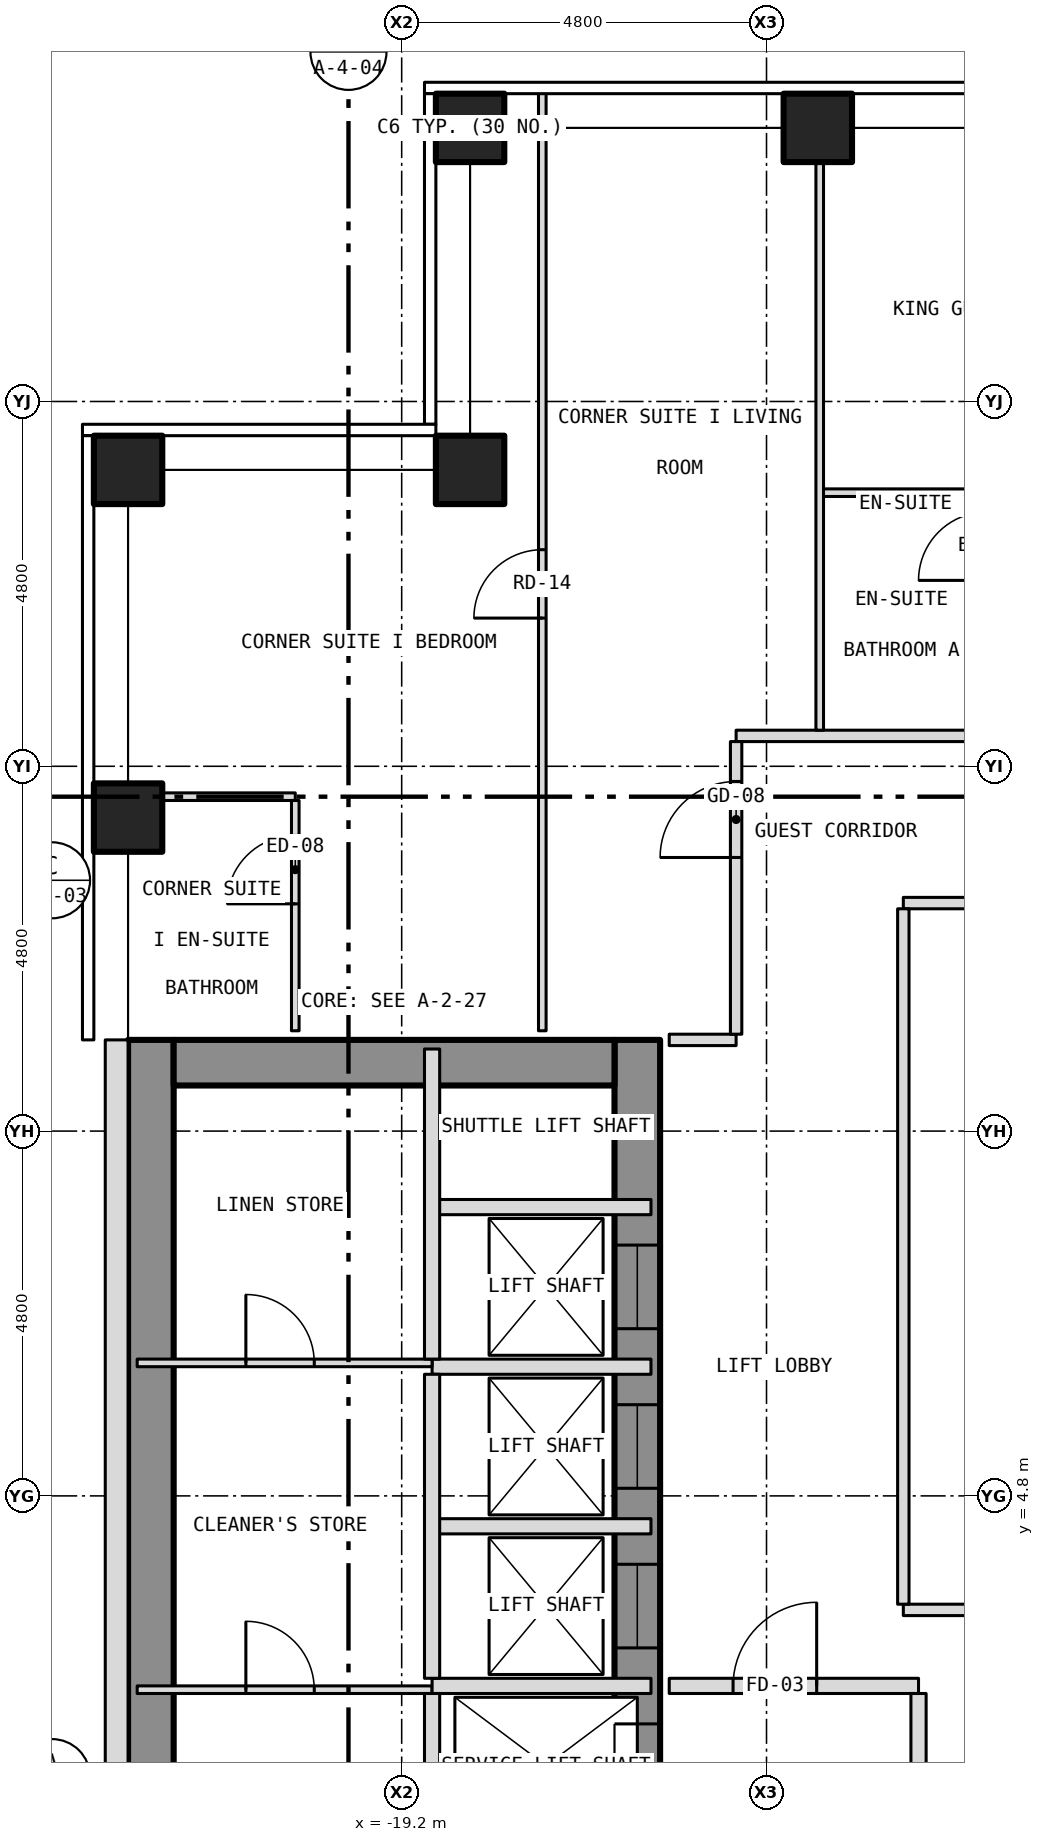
"""IFC4 building model, lengths in metres.
Left out: names, types, materials, properties, quantities, classifications, styles, units other than length and angle.
Written with IfcOpenShell. Run it as: python <this file> out.ifc"""

import sys

from ifc_helpers import new_model, si_unit, direction, frame, frame_2d, origin, origin_2d, place, context, subcontext, project, spatial, rectangle, hollow_rectangle, extrude, element, fill, save


model = new_model("IFC4")
c1 = context("Model", 3, precision=1e-05, world=origin(), true_north=direction((0.0, 1.0)))
c2 = subcontext(c1, "Body", "Model", "MODEL_VIEW")
j1 = project(units=[si_unit("LENGTHUNIT", "METRE"), si_unit("PLANEANGLEUNIT", "RADIAN")], contexts=[c1])
p1 = place(None, origin())
s1 = spatial("IfcSite", under=j1, at=p1, CompositionType="ELEMENT")
p2 = place(p1, origin())
s2 = spatial("IfcBuilding", under=s1, at=p2, CompositionType="ELEMENT")
p3 = place(p2, frame((0.0, 0.0, 99.5)))
s3 = spatial("IfcBuildingStorey", under=s2, at=p3, CompositionType="ELEMENT", Elevation=99.5)
for number, where, z_axis, x_axis in (
    (1, (-18.3, 22.8, -0.15), (0.0, 0.0, 1.0), (1.0, 0.0, 0.0)),
    (2, (-13.725, 22.8, -0.15), (0.0, 0.0, 1.0), (1.0, 0.0, 0.0)),
    (3, (-22.8, 13.725, -0.15), (0.0, 0.0, 1.0), (1.0, 0.0, 0.0)),
    (4, (-22.8, 18.3, -0.15), (0.0, 0.0, 1.0), (1.0, 0.0, 0.0)),
    (5, (-18.3, 18.3, -0.15), (0.0, 0.0, 1.0), (1.0, 0.0, 0.0)),
):
    element("IfcColumn", number, at=place(p3, frame(where, z_axis=z_axis, x_axis=x_axis)), inside=s3, PredefinedType="COLUMN", context=c2, shape_type="SweptSolid", body=[
        extrude(hollow_rectangle(XDim=0.9, YDim=0.9, WallThickness=0.05, at=origin_2d()), origin(), (0.0, 0.0, 1.0), 3.5),
    ])
p4 = place(p3, frame((-16.1, -10.8, 0.0), z_axis=(0.0, 0.0, 1.0), x_axis=(0.0, 1.0, 0.0)))
e6 = element("IfcWall", 6, at=p4, inside=s3, PredefinedType="SHEAR", context=c2, shape_type="SweptSolid", body=[
    extrude(rectangle(XDim=21.6, YDim=0.6, at=frame_2d((10.8, 0.0))), origin(), (0.0, 0.0, 1.0), 3.25),
])
p5 = place(p4, frame((9.4, 0.0, 0.0)))
e7 = element("IfcOpeningElement", 7, at=p5, cuts=e6, PredefinedType="OPENING", context=c2, shape_type="SweptSolid", body=[
    extrude(rectangle(XDim=1.1, YDim=2.1, at=frame_2d((0.55, 1.05))), frame((0.0, 0.312, 0.0), z_axis=(0.0, -1.0, 0.0), x_axis=(1.0, 0.0, 0.0)), (0.0, 0.0, 1.0), 0.624),
])
p6 = place(p4, frame((11.5, 0.0, 0.0)))
e8 = element("IfcOpeningElement", 8, at=p6, cuts=e6, PredefinedType="OPENING", context=c2, shape_type="SweptSolid", body=[
    extrude(rectangle(XDim=1.1, YDim=2.1, at=frame_2d((0.55, 1.05))), frame((0.0, 0.312, 0.0), z_axis=(0.0, -1.0, 0.0), x_axis=(1.0, 0.0, 0.0)), (0.0, 0.0, 1.0), 0.624),
])
p7 = place(p4, frame((13.6, 0.0, 0.0)))
e9 = element("IfcOpeningElement", 9, at=p7, cuts=e6, PredefinedType="OPENING", context=c2, shape_type="SweptSolid", body=[
    extrude(rectangle(XDim=1.1, YDim=2.1, at=frame_2d((0.55, 1.05))), frame((0.0, 0.312, 0.0), z_axis=(0.0, -1.0, 0.0), x_axis=(1.0, 0.0, 0.0)), (0.0, 0.0, 1.0), 0.624),
])
p8 = place(p4, frame((15.7, 0.0, 0.0)))
e10 = element("IfcOpeningElement", 10, at=p8, cuts=e6, PredefinedType="OPENING", context=c2, shape_type="SweptSolid", body=[
    extrude(rectangle(XDim=1.1, YDim=2.1, at=frame_2d((0.55, 1.05))), frame((0.0, 0.312, 0.0), z_axis=(0.0, -1.0, 0.0), x_axis=(1.0, 0.0, 0.0)), (0.0, 0.0, 1.0), 0.624),
])
p9 = place(p4, frame((17.8, 0.0, 0.0)))
e11 = element("IfcOpeningElement", 11, at=p9, cuts=e6, PredefinedType="OPENING", context=c2, shape_type="SweptSolid", body=[
    extrude(rectangle(XDim=1.1, YDim=2.1, at=frame_2d((0.55, 1.05))), frame((0.0, 0.312, 0.0), z_axis=(0.0, -1.0, 0.0), x_axis=(1.0, 0.0, 0.0)), (0.0, 0.0, 1.0), 0.624),
])
p10 = place(p4, frame((0.758, 0.0, 0.0)))
e12 = element("IfcOpeningElement", 12, at=p10, cuts=e6, PredefinedType="OPENING", context=c2, shape_type="SweptSolid", body=[
    extrude(rectangle(XDim=1.1, YDim=2.1, at=frame_2d((0.55, 1.05))), frame((0.0, 0.312, 0.0), z_axis=(0.0, -1.0, 0.0), x_axis=(1.0, 0.0, 0.0)), (0.0, 0.0, 1.0), 0.624),
])
p11 = place(p4, frame((7.5, 0.0, 0.0)))
e13 = element("IfcOpeningElement", 13, at=p11, cuts=e6, PredefinedType="OPENING", context=c2, shape_type="SweptSolid", body=[
    extrude(rectangle(XDim=1.1, YDim=2.1, at=frame_2d((0.55, 1.05))), frame((0.0, 0.312, 0.0), z_axis=(0.0, -1.0, 0.0), x_axis=(1.0, 0.0, 0.0)), (0.0, 0.0, 1.0), 0.624),
])
p12 = place(p3, frame((-22.5, -10.8, 0.0), z_axis=(0.0, 0.0, 1.0), x_axis=(0.0, 1.0, 0.0)))
e14 = element("IfcWall", 14, at=p12, inside=s3, PredefinedType="SHEAR", context=c2, shape_type="SweptSolid", body=[
    extrude(rectangle(XDim=21.6, YDim=0.6, at=frame_2d((10.8, 0.0))), origin(), (0.0, 0.0, 1.0), 3.25),
])
p13 = place(p3, frame((-22.2, 10.5, 0.0), z_axis=(0.0, 0.0, 1.0), x_axis=(1.0, 0.0, 0.0)))
e15 = element("IfcWall", 15, at=p13, inside=s3, PredefinedType="SHEAR", context=c2, shape_type="SweptSolid", body=[
    extrude(rectangle(XDim=5.8, YDim=0.6, at=frame_2d((2.9, 0.0))), origin(), (0.0, 0.0, 1.0), 3.25),
])
p14 = place(p3, frame((-22.95, 10.8, 0.0), z_axis=(0.0, 0.0, 1.0), x_axis=(0.0, -1.0, 0.0)))
e16 = element("IfcWall", 16, at=p14, inside=s3, PredefinedType="SOLIDWALL", context=c2, shape_type="SweptSolid", body=[
    extrude(rectangle(XDim=21.6, YDim=0.3, at=frame_2d((10.8, 0.0))), origin(), (0.0, 0.0, 1.0), 3.5),
])
p15 = place(p14, frame((18.05, 0.0, 1.0)))
e17 = element("IfcOpeningElement", 17, at=p15, cuts=e16, PredefinedType="OPENING", context=c2, shape_type="SweptSolid", body=[
    extrude(rectangle(XDim=0.6, YDim=1.5, at=frame_2d((0.3, 0.75))), frame((0.0, 0.162, 0.0), z_axis=(0.0, -1.0, 0.0), x_axis=(1.0, 0.0, 0.0)), (0.0, 0.0, 1.0), 0.324),
])
p16 = place(p3, frame((-22.68, 2.25, 0.0), z_axis=(0.0, 0.0, 1.0), x_axis=(1.0, 0.0, 0.0)))
e18 = element("IfcWall", 18, at=p16, inside=s3, PredefinedType="PARTITIONING", context=c2, shape_type="SweptSolid", body=[
    extrude(rectangle(XDim=3.88, YDim=0.1, at=frame_2d((1.94, 0.0))), origin(), (0.0, 0.0, 1.0), 3.25),
])
p17 = place(p16, frame((1.43, 0.0, 0.0)))
e19 = element("IfcOpeningElement", 19, at=p17, cuts=e18, PredefinedType="OPENING", context=c2, shape_type="SweptSolid", body=[
    extrude(rectangle(XDim=0.9, YDim=2.1, at=frame_2d((0.45, 1.05))), frame((0.0, 0.062, 0.0), z_axis=(0.0, -1.0, 0.0), x_axis=(1.0, 0.0, 0.0)), (0.0, 0.0, 1.0), 0.124),
])
p18 = place(p3, frame((-18.8, 2.3, 0.0), z_axis=(0.0, 0.0, 1.0), x_axis=(1.0, 0.0, 0.0)))
e20 = element("IfcWall", 20, at=p18, inside=s3, PredefinedType="PARTITIONING", context=c2, shape_type="SweptSolid", body=[
    extrude(rectangle(XDim=2.88, YDim=0.2, at=frame_2d((1.44, 0.0))), origin(), (0.0, 0.0, 1.0), 3.25),
])
p19 = place(p3, frame((-15.68, 2.3, 0.0), z_axis=(0.0, 0.0, 1.0), x_axis=(1.0, 0.0, 0.0)))
e21 = element("IfcWall", 21, at=p19, inside=s3, PredefinedType="PARTITIONING", context=c2, shape_type="SweptSolid", body=[
    extrude(rectangle(XDim=3.28, YDim=0.2, at=frame_2d((1.64, 0.0))), origin(), (0.0, 0.0, 1.0), 3.35),
])
p20 = place(p19, frame((0.84, 0.0, 0.0)))
e22 = element("IfcOpeningElement", 22, at=p20, cuts=e21, PredefinedType="OPENING", context=c2, shape_type="SweptSolid", body=[
    extrude(rectangle(XDim=1.1, YDim=2.1, at=frame_2d((0.55, 1.05))), frame((0.0, 0.112, 0.0), z_axis=(0.0, -1.0, 0.0), x_axis=(1.0, 0.0, 0.0)), (0.0, 0.0, 1.0), 0.224),
])
p21 = place(p3, frame((-12.6, 3.3, 0.0), z_axis=(0.0, 0.0, 1.0), x_axis=(1.0, 0.0, 0.0)))
e23 = element("IfcWall", 23, at=p21, inside=s3, PredefinedType="PARTITIONING", context=c2, shape_type="SweptSolid", body=[
    extrude(rectangle(XDim=25.2, YDim=0.15, at=frame_2d((12.6, 0.0))), origin(), (0.0, 0.0, 1.0), 3.35),
])
for number, where, z_axis, x_axis in (
    (24, (-18.8, 4.4, 0.0), (0.0, 0.0, 1.0), (1.0, 0.0, 0.0)),
    (25, (-18.8, 6.5, 0.0), (0.0, 0.0, 1.0), (1.0, 0.0, 0.0)),
):
    element("IfcWall", number, at=place(p3, frame(where, z_axis=z_axis, x_axis=x_axis)), inside=s3, PredefinedType="PARTITIONING", context=c2, shape_type="SweptSolid", body=[
        extrude(rectangle(XDim=2.88, YDim=0.2, at=frame_2d((1.44, 0.0))), origin(), (0.0, 0.0, 1.0), 3.25),
    ])
p22 = place(p3, frame((-22.68, 6.55, 0.0), z_axis=(0.0, 0.0, 1.0), x_axis=(1.0, 0.0, 0.0)))
e26 = element("IfcWall", 26, at=p22, inside=s3, PredefinedType="PARTITIONING", context=c2, shape_type="SweptSolid", body=[
    extrude(rectangle(XDim=3.88, YDim=0.1, at=frame_2d((1.94, 0.0))), origin(), (0.0, 0.0, 1.0), 3.25),
])
p23 = place(p22, frame((1.43, 0.0, 0.0)))
e27 = element("IfcOpeningElement", 27, at=p23, cuts=e26, PredefinedType="OPENING", context=c2, shape_type="SweptSolid", body=[
    extrude(rectangle(XDim=0.9, YDim=2.1, at=frame_2d((0.45, 1.05))), frame((0.0, 0.062, 0.0), z_axis=(0.0, -1.0, 0.0), x_axis=(1.0, 0.0, 0.0)), (0.0, 0.0, 1.0), 0.124),
])
p24 = place(p3, frame((-18.8, 8.6, 0.0), z_axis=(0.0, 0.0, 1.0), x_axis=(1.0, 0.0, 0.0)))
e28 = element("IfcWall", 28, at=p24, inside=s3, PredefinedType="PARTITIONING", context=c2, shape_type="SweptSolid", body=[
    extrude(rectangle(XDim=2.88, YDim=0.2, at=frame_2d((1.44, 0.0))), origin(), (0.0, 0.0, 1.0), 3.25),
])
p25 = place(p3, frame((-15.68, 10.8, 0.0), z_axis=(0.0, 0.0, 1.0), x_axis=(1.0, 0.0, 0.0)))
e29 = element("IfcWall", 29, at=p25, inside=s3, PredefinedType="PARTITIONING", context=c2, shape_type="SweptSolid", body=[
    extrude(rectangle(XDim=0.88, YDim=0.15, at=frame_2d((0.44, 0.0))), origin(), (0.0, 0.0, 1.0), 3.35),
])
p26 = place(p3, frame((-12.6, 12.6, 0.0), z_axis=(0.0, 0.0, 1.0), x_axis=(1.0, 0.0, 0.0)))
e30 = element("IfcWall", 30, at=p26, inside=s3, PredefinedType="PARTITIONING", context=c2, shape_type="SweptSolid", body=[
    extrude(rectangle(XDim=25.2, YDim=0.15, at=frame_2d((12.6, 0.0))), origin(), (0.0, 0.0, 1.0), 3.35),
])
p27 = place(p26, frame((5.85, 0.0, 0.0)))
e31 = element("IfcOpeningElement", 31, at=p27, cuts=e30, PredefinedType="OPENING", context=c2, shape_type="SweptSolid", body=[
    extrude(rectangle(XDim=0.9, YDim=2.1, at=frame_2d((0.45, 1.05))), frame((0.0, 0.087, 0.0), z_axis=(0.0, -1.0, 0.0), x_axis=(1.0, 0.0, 0.0)), (0.0, 0.0, 1.0), 0.174),
])
p28 = place(p26, frame((18.45, 0.0, 0.0)))
e32 = element("IfcOpeningElement", 32, at=p28, cuts=e30, PredefinedType="OPENING", context=c2, shape_type="SweptSolid", body=[
    extrude(rectangle(XDim=0.9, YDim=2.1, at=frame_2d((0.45, 1.05))), frame((0.0, 0.087, 0.0), z_axis=(0.0, -1.0, 0.0), x_axis=(1.0, 0.0, 0.0)), (0.0, 0.0, 1.0), 0.174),
])
p29 = place(p3, frame((-22.68, 14.0, 0.0), z_axis=(0.0, 0.0, 1.0), x_axis=(1.0, 0.0, 0.0)))
e33 = element("IfcWall", 33, at=p29, inside=s3, PredefinedType="PARTITIONING", context=c2, shape_type="SweptSolid", body=[
    extrude(rectangle(XDim=2.08, YDim=0.1, at=frame_2d((1.04, 0.0))), origin(), (0.0, 0.0, 1.0), 3.35),
])
p30 = place(p3, frame((-14.8, 14.8, 0.0), z_axis=(0.0, 0.0, 1.0), x_axis=(1.0, 0.0, 0.0)))
e34 = element("IfcWall", 34, at=p30, inside=s3, PredefinedType="PARTITIONING", context=c2, shape_type="SweptSolid", body=[
    extrude(rectangle(XDim=29.6, YDim=0.15, at=frame_2d((14.8, 0.0))), origin(), (0.0, 0.0, 1.0), 3.35),
])
p31 = place(p30, frame((3.963, 0.0, 0.0)))
e35 = element("IfcOpeningElement", 35, at=p31, cuts=e34, PredefinedType="OPENING", context=c2, shape_type="SweptSolid", body=[
    extrude(rectangle(XDim=1.0, YDim=2.1, at=frame_2d((0.5, 1.05))), frame((0.0, 0.087, 0.0), z_axis=(0.0, -1.0, 0.0), x_axis=(1.0, 0.0, 0.0)), (0.0, 0.0, 1.0), 0.174),
])
p32 = place(p30, frame((12.241, 0.0, 0.0)))
e36 = element("IfcOpeningElement", 36, at=p32, cuts=e34, PredefinedType="OPENING", context=c2, shape_type="SweptSolid", body=[
    extrude(rectangle(XDim=1.0, YDim=2.1, at=frame_2d((0.5, 1.05))), frame((0.0, 0.087, 0.0), z_axis=(0.0, -1.0, 0.0), x_axis=(1.0, 0.0, 0.0)), (0.0, 0.0, 1.0), 0.174),
])
p33 = place(p30, frame((21.213, 0.0, 0.0)))
e37 = element("IfcOpeningElement", 37, at=p33, cuts=e34, PredefinedType="OPENING", context=c2, shape_type="SweptSolid", body=[
    extrude(rectangle(XDim=0.9, YDim=2.1, at=frame_2d((0.45, 1.05))), frame((0.0, 0.087, 0.0), z_axis=(0.0, -1.0, 0.0), x_axis=(1.0, 0.0, 0.0)), (0.0, 0.0, 1.0), 0.174),
])
p34 = place(p3, frame((-13.7, 18.0, 0.0), z_axis=(0.0, 0.0, 1.0), x_axis=(1.0, 0.0, 0.0)))
e38 = element("IfcWall", 38, at=p34, inside=s3, PredefinedType="PARTITIONING", context=c2, shape_type="SweptSolid", body=[
    extrude(rectangle(XDim=2.2, YDim=0.1, at=frame_2d((1.1, 0.0))), origin(), (0.0, 0.0, 1.0), 3.35),
])
p35 = place(p3, frame((-20.6, 10.92, 0.0), z_axis=(0.0, 0.0, 1.0), x_axis=(0.0, 1.0, 0.0)))
e39 = element("IfcWall", 39, at=p35, inside=s3, PredefinedType="PARTITIONING", context=c2, shape_type="SweptSolid", body=[
    extrude(rectangle(XDim=3.03, YDim=0.1, at=frame_2d((1.515, 0.0))), origin(), (0.0, 0.0, 1.0), 3.35),
])
p36 = place(p35, frame((1.67, 0.0, 0.0)))
e40 = element("IfcOpeningElement", 40, at=p36, cuts=e39, PredefinedType="OPENING", context=c2, shape_type="SweptSolid", body=[
    extrude(rectangle(XDim=0.9, YDim=2.1, at=frame_2d((0.45, 1.05))), frame((0.0, 0.062, 0.0), z_axis=(0.0, -1.0, 0.0), x_axis=(1.0, 0.0, 0.0)), (0.0, 0.0, 1.0), 0.124),
])
for number, where, z_axis, x_axis in (
    (41, (-18.8, -1.8, 0.0), (0.0, 0.0, 1.0), (0.0, 1.0, 0.0)),
    (42, (-18.8, 2.4, 0.0), (0.0, 0.0, 1.0), (0.0, 1.0, 0.0)),
):
    element("IfcWall", number, at=place(p3, frame(where, z_axis=z_axis, x_axis=x_axis)), inside=s3, PredefinedType="PARTITIONING", context=c2, shape_type="SweptSolid", body=[
        extrude(rectangle(XDim=4.0, YDim=0.2, at=frame_2d((2.0, 0.0))), origin(), (0.0, 0.0, 1.0), 3.25),
    ])
p37 = place(p3, frame((-18.8, 6.6, 0.0), z_axis=(0.0, 0.0, 1.0), x_axis=(0.0, 1.0, 0.0)))
e43 = element("IfcWall", 43, at=p37, inside=s3, PredefinedType="PARTITIONING", context=c2, shape_type="SweptSolid", body=[
    extrude(rectangle(XDim=4.08, YDim=0.2, at=frame_2d((2.04, 0.0))), origin(), (0.0, 0.0, 1.0), 3.25),
])
p38 = place(p3, frame((-17.35, 10.92, 0.0), z_axis=(0.0, 0.0, 1.0), x_axis=(0.0, 1.0, 0.0)))
e44 = element("IfcWall", 44, at=p38, inside=s3, PredefinedType="PARTITIONING", context=c2, shape_type="SweptSolid", body=[
    extrude(rectangle(XDim=12.36, YDim=0.1, at=frame_2d((6.18, 0.0))), origin(), (0.0, 0.0, 1.0), 3.35),
])
p39 = place(p38, frame((5.43, 0.0, 0.0)))
e45 = element("IfcOpeningElement", 45, at=p39, cuts=e44, PredefinedType="OPENING", context=c2, shape_type="SweptSolid", body=[
    extrude(rectangle(XDim=0.9, YDim=2.1, at=frame_2d((0.45, 1.05))), frame((0.0, 0.062, 0.0), z_axis=(0.0, -1.0, 0.0), x_axis=(1.0, 0.0, 0.0)), (0.0, 0.0, 1.0), 0.124),
])
p40 = place(p3, frame((-14.8, 10.875, 0.0), z_axis=(0.0, 0.0, 1.0), x_axis=(0.0, 1.0, 0.0)))
e46 = element("IfcWall", 46, at=p40, inside=s3, PredefinedType="PARTITIONING", context=c2, shape_type="SweptSolid", body=[
    extrude(rectangle(XDim=3.85, YDim=0.15, at=frame_2d((1.925, 0.0))), origin(), (0.0, 0.0, 1.0), 3.35),
])
p41 = place(p40, frame((2.325, 0.0, 0.0)))
e47 = element("IfcOpeningElement", 47, at=p41, cuts=e46, PredefinedType="OPENING", context=c2, shape_type="SweptSolid", body=[
    extrude(rectangle(XDim=1.0, YDim=2.1, at=frame_2d((0.5, 1.05))), frame((0.0, 0.087, 0.0), z_axis=(0.0, -1.0, 0.0), x_axis=(1.0, 0.0, 0.0)), (0.0, 0.0, 1.0), 0.174),
])
p42 = place(p3, frame((-13.7, 14.875, 0.0), z_axis=(0.0, 0.0, 1.0), x_axis=(0.0, 1.0, 0.0)))
e48 = element("IfcWall", 48, at=p42, inside=s3, PredefinedType="PARTITIONING", context=c2, shape_type="SweptSolid", body=[
    extrude(rectangle(XDim=7.805, YDim=0.1, at=frame_2d((3.902, 0.0))), origin(), (0.0, 0.0, 1.0), 3.35),
])
p43 = place(p3, frame((-12.6, 3.375, 0.0), z_axis=(0.0, 0.0, 1.0), x_axis=(0.0, 1.0, 0.0)))
e49 = element("IfcWall", 49, at=p43, inside=s3, PredefinedType="PARTITIONING", context=c2, shape_type="SweptSolid", body=[
    extrude(rectangle(XDim=9.15, YDim=0.15, at=frame_2d((4.575, 0.0))), origin(), (0.0, 0.0, 1.0), 3.35),
])
p44 = place(p3, frame((-12.4, -1.8, 0.0), z_axis=(0.0, 0.0, 1.0), x_axis=(0.0, 1.0, 0.0)))
e50 = element("IfcWall", 50, at=p44, inside=s3, PredefinedType="PARTITIONING", context=c2, shape_type="SweptSolid", body=[
    extrude(rectangle(XDim=4.0, YDim=0.2, at=frame_2d((2.0, 0.0))), origin(), (0.0, 0.0, 1.0), 3.35),
])
p45 = place(p6, origin())
e51 = element("IfcDoor", 51, at=p45, inside=s3, OperationType="SLIDING_TO_LEFT", PredefinedType="DOOR", context=c2, shape_type="SweptSolid", body=[
    extrude(rectangle(XDim=1.1, YDim=2.1, at=frame_2d((0.55, 1.05))), frame((0.0, 0.025, 0.0), z_axis=(0.0, -1.0, 0.0), x_axis=(1.0, 0.0, 0.0)), (0.0, 0.0, 1.0), 0.05),
])
fill(e8, e51)
p46 = place(p7, origin())
e52 = element("IfcDoor", 52, at=p46, inside=s3, OperationType="SLIDING_TO_LEFT", PredefinedType="DOOR", context=c2, shape_type="SweptSolid", body=[
    extrude(rectangle(XDim=1.1, YDim=2.1, at=frame_2d((0.55, 1.05))), frame((0.0, 0.025, 0.0), z_axis=(0.0, -1.0, 0.0), x_axis=(1.0, 0.0, 0.0)), (0.0, 0.0, 1.0), 0.05),
])
fill(e9, e52)
p47 = place(p8, origin())
e53 = element("IfcDoor", 53, at=p47, inside=s3, OperationType="SLIDING_TO_LEFT", PredefinedType="DOOR", context=c2, shape_type="SweptSolid", body=[
    extrude(rectangle(XDim=1.1, YDim=2.1, at=frame_2d((0.55, 1.05))), frame((0.0, 0.025, 0.0), z_axis=(0.0, -1.0, 0.0), x_axis=(1.0, 0.0, 0.0)), (0.0, 0.0, 1.0), 0.05),
])
fill(e10, e53)
p48 = place(p9, origin())
e54 = element("IfcDoor", 54, at=p48, inside=s3, OperationType="SLIDING_TO_LEFT", PredefinedType="DOOR", context=c2, shape_type="SweptSolid", body=[
    extrude(rectangle(XDim=1.1, YDim=2.1, at=frame_2d((0.55, 1.05))), frame((0.0, 0.025, 0.0), z_axis=(0.0, -1.0, 0.0), x_axis=(1.0, 0.0, 0.0)), (0.0, 0.0, 1.0), 0.05),
])
fill(e11, e54)
p49 = place(p17, origin())
e55 = element("IfcDoor", 55, at=p49, inside=s3, OperationType="SINGLE_SWING_LEFT", PredefinedType="DOOR", context=c2, shape_type="SweptSolid", body=[
    extrude(rectangle(XDim=0.9, YDim=2.1, at=frame_2d((0.45, 1.05))), frame((0.0, 0.025, 0.0), z_axis=(0.0, -1.0, 0.0), x_axis=(1.0, 0.0, 0.0)), (0.0, 0.0, 1.0), 0.05),
])
fill(e19, e55)
p50 = place(p23, origin())
e56 = element("IfcDoor", 56, at=p50, inside=s3, OperationType="SINGLE_SWING_LEFT", PredefinedType="DOOR", context=c2, shape_type="SweptSolid", body=[
    extrude(rectangle(XDim=0.9, YDim=2.1, at=frame_2d((0.45, 1.05))), frame((0.0, 0.025, 0.0), z_axis=(0.0, -1.0, 0.0), x_axis=(1.0, 0.0, 0.0)), (0.0, 0.0, 1.0), 0.05),
])
fill(e27, e56)
p51 = place(p20, origin())
e57 = element("IfcDoor", 57, at=p51, inside=s3, OperationType="SINGLE_SWING_RIGHT", PredefinedType="DOOR", context=c2, shape_type="SweptSolid", body=[
    extrude(rectangle(XDim=1.1, YDim=2.1, at=frame_2d((0.55, 1.05))), frame((0.0, 0.025, 0.0), z_axis=(0.0, -1.0, 0.0), x_axis=(1.0, 0.0, 0.0)), (0.0, 0.0, 1.0), 0.05),
])
fill(e22, e57)
p52 = place(p41, origin())
e58 = element("IfcDoor", 58, at=p52, inside=s3, OperationType="SINGLE_SWING_LEFT", PredefinedType="DOOR", context=c2, shape_type="SweptSolid", body=[
    extrude(rectangle(XDim=1.0, YDim=2.1, at=frame_2d((0.5, 1.05))), frame((0.0, 0.025, 0.0), z_axis=(0.0, -1.0, 0.0), x_axis=(1.0, 0.0, 0.0)), (0.0, 0.0, 1.0), 0.05),
])
fill(e47, e58)
p53 = place(p39, origin())
e59 = element("IfcDoor", 59, at=p53, inside=s3, OperationType="SINGLE_SWING_LEFT", PredefinedType="DOOR", context=c2, shape_type="SweptSolid", body=[
    extrude(rectangle(XDim=0.9, YDim=2.1, at=frame_2d((0.45, 1.05))), frame((0.0, 0.025, 0.0), z_axis=(0.0, -1.0, 0.0), x_axis=(1.0, 0.0, 0.0)), (0.0, 0.0, 1.0), 0.05),
])
fill(e45, e59)
p54 = place(p36, origin())
e60 = element("IfcDoor", 60, at=p54, inside=s3, OperationType="SINGLE_SWING_LEFT", PredefinedType="DOOR", context=c2, shape_type="SweptSolid", body=[
    extrude(rectangle(XDim=0.9, YDim=2.1, at=frame_2d((0.45, 1.05))), frame((0.0, 0.025, 0.0), z_axis=(0.0, -1.0, 0.0), x_axis=(1.0, 0.0, 0.0)), (0.0, 0.0, 1.0), 0.05),
])
fill(e40, e60)
save(model, sys.argv[1])
